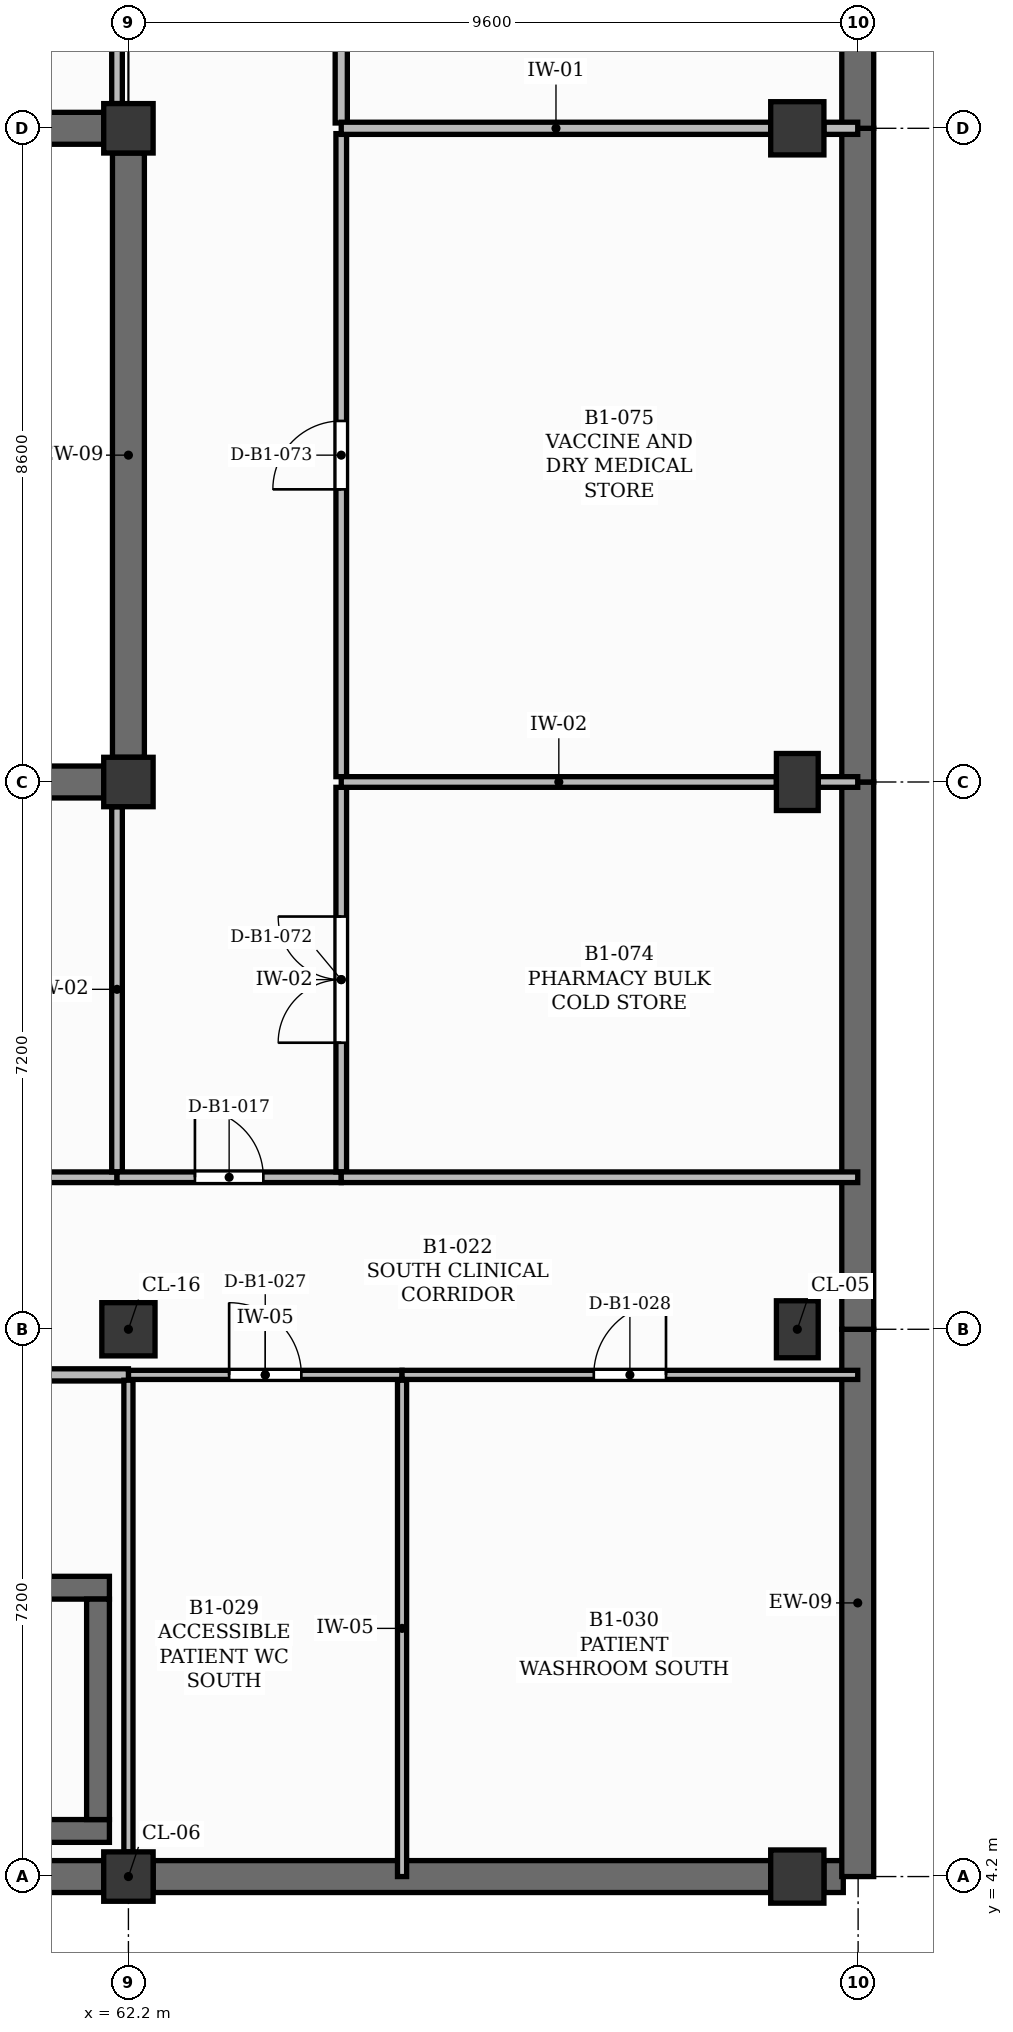
"""IFC4 building model, lengths in metres.
Left out: names, types, materials, properties, quantities, classifications, styles, units other than length and angle.
Written with IfcOpenShell. Run it as: python <this file> out.ifc"""

import sys

from ifc_helpers import new_model, si_unit, direction, frame, frame_2d, origin, origin_2d, place, context, subcontext, project, spatial, rectangle, extrude, element, fill, save


model = new_model("IFC4")
c1 = context("Model", 3, precision=1e-05, world=origin(), true_north=direction((0.0, 1.0)))
c2 = subcontext(c1, "Body", "Model", "MODEL_VIEW")
j1 = project(units=[si_unit("LENGTHUNIT", "METRE"), si_unit("PLANEANGLEUNIT", "RADIAN")], contexts=[c1])
p1 = place(None, origin())
s1 = spatial("IfcSite", under=j1, at=p1, CompositionType="ELEMENT")
p2 = place(p1, origin())
s2 = spatial("IfcBuilding", under=s1, at=p2, CompositionType="ELEMENT")
p3 = place(p2, frame((0.0, 0.0, -4.5)))
s3 = spatial("IfcBuildingStorey", under=s2, at=p3, CompositionType="ELEMENT", Elevation=-4.5)
p4 = place(p3, frame((62.2, 4.2, 0.0), z_axis=(0.0, 0.0, 1.0), x_axis=(1.0, 0.0, 0.0)))
e1 = element("IfcColumn", 1, at=p4, inside=s3, PredefinedType="COLUMN", context=c2, shape_type="SweptSolid", body=[
    extrude(rectangle(XDim=0.65, YDim=0.65, at=origin_2d()), origin(), (0.0, 0.0, 1.0), 4.2),
])
p5 = place(p3, frame((62.2, 11.4, 0.0), z_axis=(0.0, 0.0, 1.0), x_axis=(1.0, 0.0, 0.0)))
e2 = element("IfcColumn", 2, at=p5, inside=s3, PredefinedType="COLUMN", context=c2, shape_type="SweptSolid", body=[
    extrude(rectangle(XDim=0.7, YDim=0.7, at=origin_2d()), origin(), (0.0, 0.0, 1.0), 4.2),
])
for number, where, z_axis, x_axis in (
    (3, (62.2, 18.6, 0.0), (0.0, 0.0, 1.0), (1.0, 0.0, 0.0)),
    (4, (62.2, 27.2, 0.0), (0.0, 0.0, 1.0), (1.0, 0.0, 0.0)),
):
    element("IfcColumn", number, at=place(p3, frame(where, z_axis=z_axis, x_axis=x_axis)), inside=s3, PredefinedType="COLUMN", context=c2, shape_type="SweptSolid", body=[
        extrude(rectangle(XDim=0.65, YDim=0.65, at=origin_2d()), origin(), (0.0, 0.0, 1.0), 4.2),
    ])
p6 = place(p3, frame((71.0, 4.2, 0.0), z_axis=(0.0, 0.0, 1.0), x_axis=(1.0, 0.0, 0.0)))
e5 = element("IfcColumn", 5, at=p6, inside=s3, PredefinedType="COLUMN", context=c2, shape_type="SweptSolid", body=[
    extrude(rectangle(XDim=0.7, YDim=0.7, at=origin_2d()), origin(), (0.0, 0.0, 1.0), 4.2),
])
for number, where, z_axis, x_axis in (
    (6, (71.0, 11.4, 0.0), (0.0, 0.0, 1.0), (1.0, 0.0, 0.0)),
    (7, (71.0, 18.6, 0.0), (0.0, 0.0, 1.0), (1.0, 0.0, 0.0)),
):
    element("IfcColumn", number, at=place(p3, frame(where, z_axis=z_axis, x_axis=x_axis)), inside=s3, PredefinedType="COLUMN", context=c2, shape_type="SweptSolid", body=[
        extrude(rectangle(XDim=0.55, YDim=0.75, at=origin_2d()), origin(), (0.0, 0.0, 1.0), 4.2),
    ])
p7 = place(p3, frame((71.0, 27.2, 0.0), z_axis=(0.0, 0.0, 1.0), x_axis=(1.0, 0.0, 0.0)))
e8 = element("IfcColumn", 8, at=p7, inside=s3, PredefinedType="COLUMN", context=c2, shape_type="SweptSolid", body=[
    extrude(rectangle(XDim=0.7, YDim=0.7, at=origin_2d()), origin(), (0.0, 0.0, 1.0), 4.2),
])
p8 = place(p3, frame((58.775, 4.2, 0.0), z_axis=(0.0, 0.0, 1.0), x_axis=(1.0, 0.0, 0.0)))
e9 = element("IfcWall", 9, at=p8, inside=s3, PredefinedType="USERDEFINED", context=c2, shape_type="SweptSolid", body=[
    extrude(rectangle(XDim=3.1, YDim=0.42, at=frame_2d((1.55, 0.0))), origin(), (0.0, 0.0, 1.0), 4.2),
])
p9 = place(p3, frame((55.35, 18.6, 0.0), z_axis=(0.0, 0.0, 1.0), x_axis=(1.0, 0.0, 0.0)))
e10 = element("IfcWall", 10, at=p9, inside=s3, PredefinedType="USERDEFINED", context=c2, shape_type="SweptSolid", body=[
    extrude(rectangle(XDim=6.525, YDim=0.42, at=frame_2d((3.262, 0.0))), origin(), (0.0, 0.0, 1.0), 4.2),
])
p10 = place(p3, frame((55.275, 27.2, 0.0), z_axis=(0.0, 0.0, 1.0), x_axis=(1.0, 0.0, 0.0)))
e11 = element("IfcWall", 11, at=p10, inside=s3, PredefinedType="USERDEFINED", context=c2, shape_type="SweptSolid", body=[
    extrude(rectangle(XDim=6.6, YDim=0.42, at=frame_2d((3.3, 0.0))), origin(), (0.0, 0.0, 1.0), 4.2),
])
p11 = place(p3, frame((62.525, 4.2, 0.0), z_axis=(0.0, 0.0, 1.0), x_axis=(1.0, 0.0, 0.0)))
e12 = element("IfcWall", 12, at=p11, inside=s3, PredefinedType="USERDEFINED", context=c2, shape_type="SweptSolid", body=[
    extrude(rectangle(XDim=8.125, YDim=0.42, at=frame_2d((4.062, 0.0))), origin(), (0.0, 0.0, 1.0), 4.2),
])
p12 = place(p3, frame((71.35, 4.2, 0.0), z_axis=(0.0, 0.0, 1.0), x_axis=(1.0, 0.0, 0.0)))
e13 = element("IfcWall", 13, at=p12, inside=s3, PredefinedType="USERDEFINED", context=c2, shape_type="SweptSolid", body=[
    extrude(rectangle(XDim=0.255, YDim=0.42, at=frame_2d((0.127, 0.0))), origin(), (0.0, 0.0, 1.0), 4.2),
])
p13 = place(p3, frame((71.795, 4.2, 0.0), z_axis=(0.0, 0.0, 1.0), x_axis=(0.0, 1.0, 0.0)))
e14 = element("IfcWall", 14, at=p13, inside=s3, PredefinedType="USERDEFINED", context=c2, shape_type="SweptSolid", body=[
    extrude(rectangle(XDim=7.2, YDim=0.42, at=frame_2d((3.6, 0.0))), origin(), (0.0, 0.0, 1.0), 4.2),
])
p14 = place(p3, frame((71.795, 11.4, 0.0), z_axis=(0.0, 0.0, 1.0), x_axis=(0.0, 1.0, 0.0)))
e15 = element("IfcWall", 15, at=p14, inside=s3, PredefinedType="USERDEFINED", context=c2, shape_type="SweptSolid", body=[
    extrude(rectangle(XDim=7.2, YDim=0.42, at=frame_2d((3.6, 0.0))), origin(), (0.0, 0.0, 1.0), 4.2),
])
p15 = place(p3, frame((62.2, 18.925, 0.0), z_axis=(0.0, 0.0, 1.0), x_axis=(0.0, 1.0, 0.0)))
e16 = element("IfcWall", 16, at=p15, inside=s3, PredefinedType="USERDEFINED", context=c2, shape_type="SweptSolid", body=[
    extrude(rectangle(XDim=7.95, YDim=0.42, at=frame_2d((3.975, 0.0))), origin(), (0.0, 0.0, 1.0), 4.2),
])
p16 = place(p3, frame((71.795, 18.6, 0.0), z_axis=(0.0, 0.0, 1.0), x_axis=(0.0, 1.0, 0.0)))
e17 = element("IfcWall", 17, at=p16, inside=s3, PredefinedType="USERDEFINED", context=c2, shape_type="SweptSolid", body=[
    extrude(rectangle(XDim=8.6, YDim=0.42, at=frame_2d((4.3, 0.0))), origin(), (0.0, 0.0, 1.0), 4.2),
])
p17 = place(p3, frame((71.795, 27.2, 0.0), z_axis=(0.0, 0.0, 1.0), x_axis=(0.0, 1.0, 0.0)))
e18 = element("IfcWall", 18, at=p17, inside=s3, PredefinedType="USERDEFINED", context=c2, shape_type="SweptSolid", body=[
    extrude(rectangle(XDim=9.6, YDim=0.42, at=frame_2d((4.8, 0.0))), origin(), (0.0, 0.0, 1.0), 4.2),
])
for number, where, z_axis, x_axis in (
    (19, (55.25, 4.8, 0.0), (0.0, 0.0, 1.0), (1.0, 0.0, 0.0)),
    (20, (55.25, 8.0, 0.0), (0.0, 0.0, 1.0), (1.0, 0.0, 0.0)),
):
    element("IfcWall", number, at=place(p3, frame(where, z_axis=z_axis, x_axis=x_axis)), inside=s3, PredefinedType="SHEAR", context=c2, shape_type="SweptSolid", body=[
        extrude(rectangle(XDim=6.7, YDim=0.3, at=frame_2d((3.35, 0.0))), origin(), (0.0, 0.0, 1.0), 4.25),
    ])
p18 = place(p3, frame((61.8, 4.95, 0.0), z_axis=(0.0, 0.0, 1.0), x_axis=(0.0, 1.0, 0.0)))
e21 = element("IfcWall", 21, at=p18, inside=s3, PredefinedType="SHEAR", context=c2, shape_type="SweptSolid", body=[
    extrude(rectangle(XDim=2.9, YDim=0.3, at=frame_2d((1.45, 0.0))), origin(), (0.0, 0.0, 1.0), 4.25),
])
p19 = place(p3, frame((55.0, 13.4, 0.0), z_axis=(0.0, 0.0, 1.0), x_axis=(1.0, 0.0, 0.0)))
e22 = element("IfcWall", 22, at=p19, inside=s3, PredefinedType="PARTITIONING", context=c2, shape_type="SweptSolid", body=[
    extrude(rectangle(XDim=7.05, YDim=0.14, at=frame_2d((3.525, 0.0))), origin(), (0.0, 0.0, 1.0), 4.08),
])
p20 = place(p19, frame((2.975, 0.0, 0.0)))
e23 = element("IfcOpeningElement", 23, at=p20, cuts=e22, PredefinedType="OPENING", context=c2, shape_type="SweptSolid", body=[
    extrude(rectangle(XDim=1.1, YDim=2.1, at=frame_2d((0.55, 1.05))), frame((0.0, 0.08, 0.0), z_axis=(0.0, -1.0, 0.0), x_axis=(1.0, 0.0, 0.0)), (0.0, 0.0, 1.0), 0.16),
])
p21 = place(p3, frame((62.05, 13.47, 0.0), z_axis=(0.0, 0.0, 1.0), x_axis=(0.0, 1.0, 0.0)))
e24 = element("IfcWall", 24, at=p21, inside=s3, PredefinedType="PARTITIONING", context=c2, shape_type="SweptSolid", body=[
    extrude(rectangle(XDim=4.805, YDim=0.14, at=frame_2d((2.402, 0.0))), origin(), (0.0, 0.0, 1.0), 3.5),
])
p22 = place(p3, frame((62.05, 13.4, 0.0), z_axis=(0.0, 0.0, 1.0), x_axis=(1.0, 0.0, 0.0)))
e25 = element("IfcWall", 25, at=p22, inside=s3, PredefinedType="PARTITIONING", context=c2, shape_type="SweptSolid", body=[
    extrude(rectangle(XDim=2.95, YDim=0.14, at=frame_2d((1.475, 0.0))), origin(), (0.0, 0.0, 1.0), 4.08),
])
p23 = place(p22, frame((1.025, 0.0, 0.0)))
e26 = element("IfcOpeningElement", 26, at=p23, cuts=e25, PredefinedType="OPENING", context=c2, shape_type="SweptSolid", body=[
    extrude(rectangle(XDim=0.9, YDim=2.1, at=frame_2d((0.45, 1.05))), frame((0.0, 0.08, 0.0), z_axis=(0.0, -1.0, 0.0), x_axis=(1.0, 0.0, 0.0)), (0.0, 0.0, 1.0), 0.16),
])
p24 = place(p3, frame((62.05, 27.525, 0.0), z_axis=(0.0, 0.0, 1.0), x_axis=(0.0, 1.0, 0.0)))
e27 = element("IfcWall", 27, at=p24, inside=s3, PredefinedType="PARTITIONING", context=c2, shape_type="SweptSolid", body=[
    extrude(rectangle(XDim=2.805, YDim=0.14, at=frame_2d((1.403, 0.0))), origin(), (0.0, 0.0, 1.0), 3.4),
])
p25 = place(p3, frame((62.2, 10.8, 0.0), z_axis=(0.0, 0.0, 1.0), x_axis=(1.0, 0.0, 0.0)))
e28 = element("IfcWall", 28, at=p25, inside=s3, PredefinedType="PLUMBINGWALL", context=c2, shape_type="SweptSolid", body=[
    extrude(rectangle(XDim=3.6, YDim=0.12, at=frame_2d((1.8, 0.0))), origin(), (0.0, 0.0, 1.0), 4.08),
])
p26 = place(p25, frame((1.325, 0.0, 0.0)))
e29 = element("IfcOpeningElement", 29, at=p26, cuts=e28, PredefinedType="OPENING", context=c2, shape_type="SweptSolid", body=[
    extrude(rectangle(XDim=0.95, YDim=2.1, at=frame_2d((0.475, 1.05))), frame((0.0, 0.07, 0.0), z_axis=(0.0, -1.0, 0.0), x_axis=(1.0, 0.0, 0.0)), (0.0, 0.0, 1.0), 0.14),
])
p27 = place(p3, frame((65.0, 13.47, 0.0), z_axis=(0.0, 0.0, 1.0), x_axis=(0.0, 1.0, 0.0)))
e30 = element("IfcWall", 30, at=p27, inside=s3, PredefinedType="PARTITIONING", context=c2, shape_type="SweptSolid", body=[
    extrude(rectangle(XDim=5.06, YDim=0.14, at=frame_2d((2.53, 0.0))), origin(), (0.0, 0.0, 1.0), 4.08),
])
p28 = place(p27, frame((1.7, 0.0, 0.0)))
e31 = element("IfcOpeningElement", 31, at=p28, cuts=e30, PredefinedType="OPENING", context=c2, shape_type="SweptSolid", body=[
    extrude(rectangle(XDim=1.66, YDim=2.3, at=frame_2d((0.83, 1.15))), frame((0.0, 0.08, 0.0), z_axis=(0.0, -1.0, 0.0), x_axis=(1.0, 0.0, 0.0)), (0.0, 0.0, 1.0), 0.16),
])
p29 = place(p3, frame((65.0, 13.4, 0.0), z_axis=(0.0, 0.0, 1.0), x_axis=(1.0, 0.0, 0.0)))
e32 = element("IfcWall", 32, at=p29, inside=s3, PredefinedType="PARTITIONING", context=c2, shape_type="SweptSolid", body=[
    extrude(rectangle(XDim=6.795, YDim=0.14, at=frame_2d((3.397, 0.0))), origin(), (0.0, 0.0, 1.0), 4.08),
])
p30 = place(p3, frame((65.0, 18.67, 0.0), z_axis=(0.0, 0.0, 1.0), x_axis=(0.0, 1.0, 0.0)))
e33 = element("IfcWall", 33, at=p30, inside=s3, PredefinedType="PARTITIONING", context=c2, shape_type="SweptSolid", body=[
    extrude(rectangle(XDim=8.46, YDim=0.14, at=frame_2d((4.23, 0.0))), origin(), (0.0, 0.0, 1.0), 4.08),
])
p31 = place(p30, frame((3.78, 0.0, 0.0)))
e34 = element("IfcOpeningElement", 34, at=p31, cuts=e33, PredefinedType="OPENING", context=c2, shape_type="SweptSolid", body=[
    extrude(rectangle(XDim=0.9, YDim=2.1, at=frame_2d((0.45, 1.05))), frame((0.0, 0.08, 0.0), z_axis=(0.0, -1.0, 0.0), x_axis=(1.0, 0.0, 0.0)), (0.0, 0.0, 1.0), 0.16),
])
p32 = place(p3, frame((65.0, 18.6, 0.0), z_axis=(0.0, 0.0, 1.0), x_axis=(1.0, 0.0, 0.0)))
e35 = element("IfcWall", 35, at=p32, inside=s3, PredefinedType="PARTITIONING", context=c2, shape_type="SweptSolid", body=[
    extrude(rectangle(XDim=5.725, YDim=0.14, at=frame_2d((2.863, 0.0))), origin(), (0.0, 0.0, 1.0), 3.4),
])
p33 = place(p3, frame((71.275, 18.6, 0.0), z_axis=(0.0, 0.0, 1.0), x_axis=(1.0, 0.0, 0.0)))
e36 = element("IfcWall", 36, at=p33, inside=s3, PredefinedType="PARTITIONING", context=c2, shape_type="SweptSolid", body=[
    extrude(rectangle(XDim=0.52, YDim=0.14, at=frame_2d((0.26, 0.0))), origin(), (0.0, 0.0, 1.0), 4.08),
])
p34 = place(p3, frame((65.0, 27.27, 0.0), z_axis=(0.0, 0.0, 1.0), x_axis=(0.0, 1.0, 0.0)))
e37 = element("IfcWall", 37, at=p34, inside=s3, PredefinedType="PARTITIONING", context=c2, shape_type="SweptSolid", body=[
    extrude(rectangle(XDim=3.06, YDim=0.16, at=frame_2d((1.53, 0.0))), origin(), (0.0, 0.0, 1.0), 4.08),
])
p35 = place(p34, frame((1.05, 0.0, 0.0)))
e38 = element("IfcOpeningElement", 38, at=p35, cuts=e37, PredefinedType="OPENING", context=c2, shape_type="SweptSolid", body=[
    extrude(rectangle(XDim=0.96, YDim=2.1, at=frame_2d((0.48, 1.05))), frame((0.0, 0.09, 0.0), z_axis=(0.0, -1.0, 0.0), x_axis=(1.0, 0.0, 0.0)), (0.0, 0.0, 1.0), 0.18),
])
p36 = place(p3, frame((65.0, 27.2, 0.0), z_axis=(0.0, 0.0, 1.0), x_axis=(1.0, 0.0, 0.0)))
e39 = element("IfcWall", 39, at=p36, inside=s3, PredefinedType="PARTITIONING", context=c2, shape_type="SweptSolid", body=[
    extrude(rectangle(XDim=5.65, YDim=0.16, at=frame_2d((2.825, 0.0))), origin(), (0.0, 0.0, 1.0), 3.4),
])
p37 = place(p3, frame((71.35, 27.2, 0.0), z_axis=(0.0, 0.0, 1.0), x_axis=(1.0, 0.0, 0.0)))
e40 = element("IfcWall", 40, at=p37, inside=s3, PredefinedType="PARTITIONING", context=c2, shape_type="SweptSolid", body=[
    extrude(rectangle(XDim=0.445, YDim=0.16, at=frame_2d((0.222, 0.0))), origin(), (0.0, 0.0, 1.0), 4.08),
])
p38 = place(p3, frame((65.8, 4.2, 0.0), z_axis=(0.0, 0.0, 1.0), x_axis=(0.0, 1.0, 0.0)))
e41 = element("IfcWall", 41, at=p38, inside=s3, PredefinedType="PLUMBINGWALL", context=c2, shape_type="SweptSolid", body=[
    extrude(rectangle(XDim=6.53, YDim=0.12, at=frame_2d((3.265, 0.0))), origin(), (0.0, 0.0, 1.0), 4.08),
])
p39 = place(p3, frame((65.8, 10.8, 0.0), z_axis=(0.0, 0.0, 1.0), x_axis=(1.0, 0.0, 0.0)))
e42 = element("IfcWall", 42, at=p39, inside=s3, PredefinedType="PLUMBINGWALL", context=c2, shape_type="SweptSolid", body=[
    extrude(rectangle(XDim=5.995, YDim=0.12, at=frame_2d((2.998, 0.0))), origin(), (0.0, 0.0, 1.0), 4.08),
])
p40 = place(p39, frame((2.522, 0.0, 0.0)))
e43 = element("IfcOpeningElement", 43, at=p40, cuts=e42, PredefinedType="OPENING", context=c2, shape_type="SweptSolid", body=[
    extrude(rectangle(XDim=0.95, YDim=2.1, at=frame_2d((0.475, 1.05))), frame((0.0, 0.07, 0.0), z_axis=(0.0, -1.0, 0.0), x_axis=(1.0, 0.0, 0.0)), (0.0, 0.0, 1.0), 0.14),
])
p41 = place(p3, frame((59.4, 10.8, 0.0), z_axis=(0.0, 0.0, 1.0), x_axis=(1.0, 0.0, 0.0)))
e44 = element("IfcWall", 44, at=p41, inside=s3, PredefinedType="PARTITIONING", context=c2, shape_type="SweptSolid", body=[
    extrude(rectangle(XDim=2.8, YDim=0.16, at=frame_2d((1.4, 0.0))), origin(), (0.0, 0.0, 1.0), 4.08),
])
p42 = place(p3, frame((62.2, 4.525, 0.0), z_axis=(0.0, 0.0, 1.0), x_axis=(0.0, 1.0, 0.0)))
e45 = element("IfcWall", 45, at=p42, inside=s3, PredefinedType="PLUMBINGWALL", context=c2, shape_type="SweptSolid", body=[
    extrude(rectangle(XDim=6.205, YDim=0.12, at=frame_2d((3.103, 0.0))), origin(), (0.0, 0.0, 1.0), 3.5),
])
p43 = place(p23, origin())
e46 = element("IfcDoor", 46, at=p43, inside=s3, OperationType="SINGLE_SWING_LEFT", PredefinedType="DOOR", context=c2, shape_type="SweptSolid", body=[
    extrude(rectangle(XDim=0.9, YDim=2.1, at=frame_2d((0.45, 1.05))), frame((0.0, 0.025, 0.0), z_axis=(0.0, -1.0, 0.0), x_axis=(1.0, 0.0, 0.0)), (0.0, 0.0, 1.0), 0.05),
])
fill(e26, e46)
p44 = place(p26, origin())
e47 = element("IfcDoor", 47, at=p44, inside=s3, OperationType="SINGLE_SWING_LEFT", PredefinedType="DOOR", context=c2, shape_type="SweptSolid", body=[
    extrude(rectangle(XDim=0.95, YDim=2.1, at=frame_2d((0.475, 1.05))), frame((0.0, 0.025, 0.0), z_axis=(0.0, -1.0, 0.0), x_axis=(1.0, 0.0, 0.0)), (0.0, 0.0, 1.0), 0.05),
])
fill(e29, e47)
p45 = place(p40, origin())
e48 = element("IfcDoor", 48, at=p45, inside=s3, OperationType="SINGLE_SWING_RIGHT", PredefinedType="DOOR", context=c2, shape_type="SweptSolid", body=[
    extrude(rectangle(XDim=0.95, YDim=2.1, at=frame_2d((0.475, 1.05))), frame((0.0, 0.025, 0.0), z_axis=(0.0, -1.0, 0.0), x_axis=(1.0, 0.0, 0.0)), (0.0, 0.0, 1.0), 0.05),
])
fill(e43, e48)
p46 = place(p28, origin())
e49 = element("IfcDoor", 49, at=p46, inside=s3, OperationType="DOUBLE_DOOR_SINGLE_SWING", PredefinedType="DOOR", context=c2, shape_type="SweptSolid", body=[
    extrude(rectangle(XDim=1.66, YDim=2.3, at=frame_2d((0.83, 1.15))), frame((0.0, 0.025, 0.0), z_axis=(0.0, -1.0, 0.0), x_axis=(1.0, 0.0, 0.0)), (0.0, 0.0, 1.0), 0.05),
])
fill(e31, e49)
p47 = place(p31, origin())
e50 = element("IfcDoor", 50, at=p47, inside=s3, OperationType="SINGLE_SWING_LEFT", PredefinedType="DOOR", context=c2, shape_type="SweptSolid", body=[
    extrude(rectangle(XDim=0.9, YDim=2.1, at=frame_2d((0.45, 1.05))), frame((0.0, 0.025, 0.0), z_axis=(0.0, -1.0, 0.0), x_axis=(1.0, 0.0, 0.0)), (0.0, 0.0, 1.0), 0.05),
])
fill(e34, e50)
save(model, sys.argv[1])
